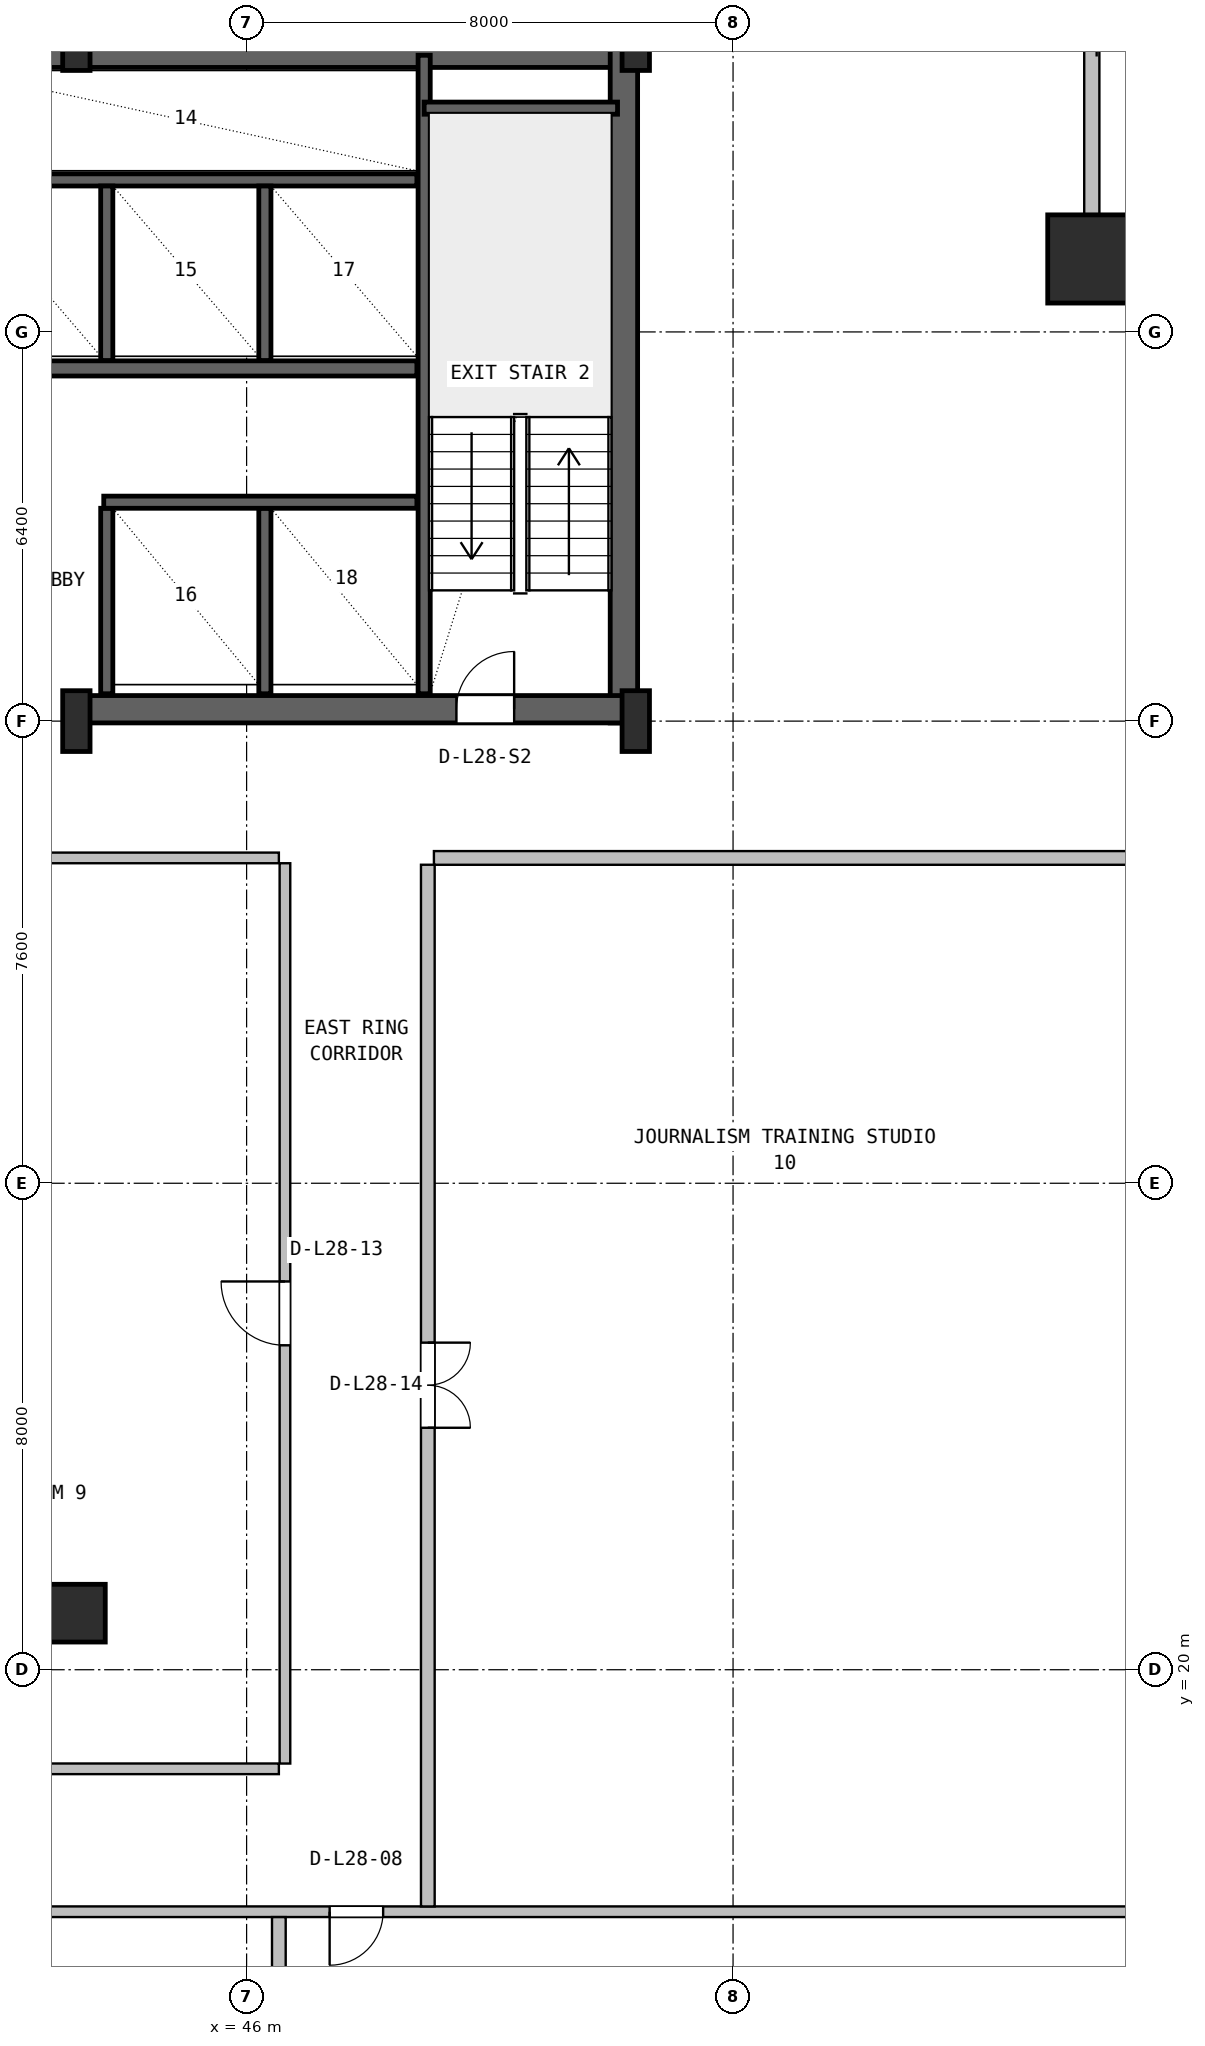
"""IFC4 building model, lengths in metres.
Left out: names, types, materials, properties, quantities, classifications, styles, units other than length and angle.
Written with IfcOpenShell. Run it as: python <this file> out.ifc"""

import sys

from ifc_helpers import new_model, si_unit, direction, frame, frame_2d, origin, origin_2d, place, context, subcontext, project, spatial, rectangle, hollow_rectangle, i_section, extrude, source, transform, mapped, element, fill, save


model = new_model("IFC4")
c1 = context("Model", 3, precision=1e-05, world=origin(), true_north=direction((0.0, 1.0)))
c2 = subcontext(c1, "Body", "Model", "MODEL_VIEW")
j1 = project(units=[si_unit("LENGTHUNIT", "METRE"), si_unit("PLANEANGLEUNIT", "RADIAN")], contexts=[c1])
p1 = place(None, origin())
s1 = spatial("IfcSite", under=j1, at=p1, CompositionType="ELEMENT")
p2 = place(p1, origin())
s2 = spatial("IfcBuilding", under=s1, at=p2, CompositionType="ELEMENT")
p3 = place(p2, frame((0.0, 0.0, 118.2)))
s3 = spatial("IfcBuildingStorey", under=s2, at=p3, CompositionType="ELEMENT", Elevation=118.2)
p4 = place(p3, frame((15.6, 46.575, 0.0), z_axis=(0.0, 0.0, 1.0), x_axis=(1.0, 0.0, 0.0)))
e1 = element("IfcWall", 1, at=p4, inside=s3, PredefinedType="SHEAR", context=c2, shape_type="SweptSolid", body=[
    extrude(rectangle(XDim=36.8, YDim=0.45, at=frame_2d((18.4, 0.0))), origin(), (0.0, 0.0, 1.0), 3.55),
])
p5 = place(p3, frame((52.205, 35.57, 0.0), z_axis=(0.0, 0.0, 1.0), x_axis=(0.0, 1.0, 0.0)))
e2 = element("IfcWall", 2, at=p5, inside=s3, PredefinedType="SHEAR", context=c2, shape_type="SweptSolid", body=[
    extrude(rectangle(XDim=11.23, YDim=0.45, at=frame_2d((5.615, 0.0))), origin(), (0.0, 0.0, 1.0), 3.55),
])
p6 = place(p3, frame((43.2, 35.795, 0.0), z_axis=(0.0, 0.0, 1.0), x_axis=(1.0, 0.0, 0.0)))
e3 = element("IfcWall", 3, at=p6, inside=s3, PredefinedType="SHEAR", context=c2, shape_type="SweptSolid", body=[
    extrude(rectangle(XDim=9.23, YDim=0.45, at=frame_2d((4.615, 0.0))), origin(), (0.0, 0.0, 1.0), 3.55),
])
p7 = place(p6, frame((6.25, 0.0, 0.0)))
e4 = element("IfcOpeningElement", 4, at=p7, cuts=e3, PredefinedType="OPENING", context=c2, shape_type="SweptSolid", body=[
    extrude(rectangle(XDim=0.95, YDim=2.1, at=frame_2d((0.475, 1.05))), frame((0.0, 0.235, 0.0), z_axis=(0.0, -1.0, 0.0), x_axis=(1.0, 0.0, 0.0)), (0.0, 0.0, 1.0), 0.47),
])
m1 = source(origin(), c2, "Body", "SweptSolid", [
    extrude(i_section(OverallWidth=0.45, OverallDepth=1.0, WebThickness=0.016, FlangeThickness=0.03, FilletRadius=0.016, at=origin_2d()), origin(), (0.0, 0.0, 1.0), 3.8),
])
for number, where, z_axis, x_axis in (
    (5, (43.2, 35.6, 0.0), (0.0, 0.0, 1.0), (1.0, 0.0, 0.0)),
    (6, (43.2, 46.8, 0.0), (0.0, 0.0, 1.0), (1.0, 0.0, 0.0)),
    (7, (52.4, 35.6, 0.0), (0.0, 0.0, 1.0), (1.0, 0.0, 0.0)),
    (8, (52.4, 46.8, 0.0), (0.0, 0.0, 1.0), (1.0, 0.0, 0.0)),
):
    element("IfcColumn", number, at=place(p3, frame(where, z_axis=z_axis, x_axis=x_axis)), inside=s3, PredefinedType="COLUMN", context=c2, shape_type="MappedRepresentation", body=[
        mapped(m1, transform((0.0, 0.0, 0.0), x_axis=(1.0, 0.0, 0.0), y_axis=(0.0, 1.0, 0.0), z_axis=(0.0, 0.0, 1.0), scale=1.0)),
    ])
m2 = source(origin(), c2, "Body", "SweptSolid", [
    extrude(hollow_rectangle(XDim=1.45, YDim=1.45, WallThickness=0.055, at=origin_2d()), origin(), (0.0, 0.0, 1.0), 3.8),
])
p8 = place(p3, frame((59.9, 43.2, 0.0), z_axis=(0.0, 0.0, 1.0), x_axis=(1.0, 0.0, 0.0)))
e9 = element("IfcColumn", 9, at=p8, inside=s3, PredefinedType="COLUMN", context=c2, shape_type="MappedRepresentation", body=[
    mapped(m2, transform((0.0, 0.0, 0.0), x_axis=(1.0, 0.0, 0.0), y_axis=(0.0, 1.0, 0.0), z_axis=(0.0, 0.0, 1.0), scale=1.0)),
])
m3 = source(origin(), c2, "Body", "SweptSolid", [
    extrude(rectangle(XDim=0.95, YDim=0.95, at=origin_2d()), origin(), (0.0, 0.0, 1.0), 3.8),
])
p9 = place(p3, frame((43.2, 20.93, 0.0), z_axis=(0.0, 0.0, 1.0), x_axis=(1.0, 0.0, 0.0)))
e10 = element("IfcColumn", 10, at=p9, inside=s3, PredefinedType="COLUMN", context=c2, shape_type="MappedRepresentation", body=[
    mapped(m3, transform((0.0, 0.0, 0.0), x_axis=(1.0, 0.0, 0.0), y_axis=(0.0, 1.0, 0.0), z_axis=(0.0, 0.0, 1.0), scale=1.0)),
])
p10 = place(p3, frame((60.03, 43.2, 0.0), z_axis=(0.0, 0.0, 1.0), x_axis=(1.0, 0.0, 0.0)))
e11 = element("IfcWall", 11, at=p10, inside=s3, PredefinedType="SOLIDWALL", context=c2, shape_type="SweptSolid", body=[
    extrude(rectangle(XDim=3.39, YDim=0.25, at=frame_2d((1.695, 0.0))), origin(), (0.0, 0.0, 1.0), 3.53),
])
p11 = place(p3, frame((59.9, 43.12, 0.0), z_axis=(0.0, 0.0, 1.0), x_axis=(0.0, 1.0, 0.0)))
e12 = element("IfcWall", 12, at=p11, inside=s3, PredefinedType="SOLIDWALL", context=c2, shape_type="SweptSolid", body=[
    extrude(rectangle(XDim=3.6, YDim=0.25, at=frame_2d((1.8, 0.0))), origin(), (0.0, 0.0, 1.0), 3.108),
])
p12 = place(p3, frame((48.92, 36.05, 0.0), z_axis=(0.0, 0.0, 1.0), x_axis=(0.0, 1.0, 0.0)))
e13 = element("IfcWall", 13, at=p12, inside=s3, PredefinedType="SHEAR", context=c2, shape_type="SweptSolid", body=[
    extrude(rectangle(XDim=10.5, YDim=0.2, at=frame_2d((5.25, 0.0))), origin(), (0.0, 0.0, 1.0), 3.55),
])
p13 = place(p3, frame((48.92, 45.68, 0.0), z_axis=(0.0, 0.0, 1.0), x_axis=(1.0, 0.0, 0.0)))
e14 = element("IfcWall", 14, at=p13, inside=s3, PredefinedType="SHEAR", context=c2, shape_type="SweptSolid", body=[
    extrude(rectangle(XDim=3.18, YDim=0.2, at=frame_2d((1.59, 0.0))), origin(), (0.0, 0.0, 1.0), 3.55),
])
p14 = place(p3, frame((24.98, 41.4, 0.0), z_axis=(0.0, 0.0, 1.0), x_axis=(1.0, 0.0, 0.0)))
e15 = element("IfcWall", 15, at=p14, inside=s3, PredefinedType="SHEAR", context=c2, shape_type="SweptSolid", body=[
    extrude(rectangle(XDim=23.82, YDim=0.25, at=frame_2d((11.91, 0.0))), origin(), (0.0, 0.0, 1.0), 3.55),
])
p15 = place(p14, frame((8.87, 0.0, 0.0)))
e16 = element("IfcOpeningElement", 16, at=p15, cuts=e15, PredefinedType="OPENING", context=c2, shape_type="SweptSolid", body=[
    extrude(rectangle(XDim=1.1, YDim=2.18, at=frame_2d((0.55, 1.09))), frame((0.0, 0.135, 0.0), z_axis=(0.0, -1.0, 0.0), x_axis=(1.0, 0.0, 0.0)), (0.0, 0.0, 1.0), 0.27),
])
p16 = place(p14, frame((11.47, 0.0, 0.0)))
e17 = element("IfcOpeningElement", 17, at=p16, cuts=e15, PredefinedType="OPENING", context=c2, shape_type="SweptSolid", body=[
    extrude(rectangle(XDim=1.1, YDim=2.18, at=frame_2d((0.55, 1.09))), frame((0.0, 0.135, 0.0), z_axis=(0.0, -1.0, 0.0), x_axis=(1.0, 0.0, 0.0)), (0.0, 0.0, 1.0), 0.27),
])
p17 = place(p14, frame((14.07, 0.0, 0.0)))
e18 = element("IfcOpeningElement", 18, at=p17, cuts=e15, PredefinedType="OPENING", context=c2, shape_type="SweptSolid", body=[
    extrude(rectangle(XDim=1.1, YDim=2.18, at=frame_2d((0.55, 1.09))), frame((0.0, 0.135, 0.0), z_axis=(0.0, -1.0, 0.0), x_axis=(1.0, 0.0, 0.0)), (0.0, 0.0, 1.0), 0.27),
])
p18 = place(p14, frame((1.81, 0.0, 0.0)))
e19 = element("IfcOpeningElement", 19, at=p18, cuts=e15, PredefinedType="OPENING", context=c2, shape_type="SweptSolid", body=[
    extrude(rectangle(XDim=0.92, YDim=2.08, at=frame_2d((0.46, 1.04))), frame((0.0, 0.135, 0.0), z_axis=(0.0, -1.0, 0.0), x_axis=(1.0, 0.0, 0.0)), (0.0, 0.0, 1.0), 0.27),
])
p19 = place(p14, frame((5.71, 0.0, 0.0)))
e20 = element("IfcOpeningElement", 20, at=p19, cuts=e15, PredefinedType="OPENING", context=c2, shape_type="SweptSolid", body=[
    extrude(rectangle(XDim=0.92, YDim=2.08, at=frame_2d((0.46, 1.04))), frame((0.0, 0.135, 0.0), z_axis=(0.0, -1.0, 0.0), x_axis=(1.0, 0.0, 0.0)), (0.0, 0.0, 1.0), 0.27),
])
p20 = place(p3, frame((41.22, 44.5, 0.0), z_axis=(0.0, 0.0, 1.0), x_axis=(1.0, 0.0, 0.0)))
e21 = element("IfcWall", 21, at=p20, inside=s3, PredefinedType="SHEAR", context=c2, shape_type="SweptSolid", body=[
    extrude(rectangle(XDim=7.58, YDim=0.2, at=frame_2d((3.79, 0.0))), origin(), (0.0, 0.0, 1.0), 3.55),
])
for number, where, z_axis, x_axis in (
    (22, (43.7, 41.53, 0.0), (0.0, 0.0, 1.0), (0.0, 1.0, 0.0)),
    (23, (46.3, 41.53, 0.0), (0.0, 0.0, 1.0), (0.0, 1.0, 0.0)),
):
    element("IfcWall", number, at=place(p3, frame(where, z_axis=z_axis, x_axis=x_axis)), inside=s3, PredefinedType="SHEAR", context=c2, shape_type="SweptSolid", body=[
        extrude(rectangle(XDim=2.87, YDim=0.2, at=frame_2d((1.435, 0.0))), origin(), (0.0, 0.0, 1.0), 3.55),
    ])
for number, where, z_axis, x_axis in (
    (24, (43.7, 36.05, 0.0), (0.0, 0.0, 1.0), (0.0, 1.0, 0.0)),
    (25, (46.3, 36.05, 0.0), (0.0, 0.0, 1.0), (0.0, 1.0, 0.0)),
):
    element("IfcWall", number, at=place(p3, frame(where, z_axis=z_axis, x_axis=x_axis)), inside=s3, PredefinedType="SHEAR", context=c2, shape_type="SweptSolid", body=[
        extrude(rectangle(XDim=3.05, YDim=0.2, at=frame_2d((1.525, 0.0))), origin(), (0.0, 0.0, 1.0), 3.55),
    ])
p21 = place(p3, frame((43.65, 39.2, 0.0), z_axis=(0.0, 0.0, 1.0), x_axis=(1.0, 0.0, 0.0)))
e26 = element("IfcWall", 26, at=p21, inside=s3, PredefinedType="SHEAR", context=c2, shape_type="SweptSolid", body=[
    extrude(rectangle(XDim=5.15, YDim=0.2, at=frame_2d((2.575, 0.0))), origin(), (0.0, 0.0, 1.0), 3.55),
])
p22 = place(p3, frame((4.68, 16.02, 0.0), z_axis=(0.0, 0.0, 1.0), x_axis=(1.0, 0.0, 0.0)))
e27 = element("IfcWall", 27, at=p22, inside=s3, PredefinedType="PARTITIONING", context=c2, shape_type="SweptSolid", body=[
    extrude(rectangle(XDim=58.64, YDim=0.175, at=frame_2d((29.32, 0.0))), origin(), (0.0, 0.0, 1.0), 2.83),
])
p23 = place(p22, frame((16.13, 0.0, 0.0)))
e28 = element("IfcOpeningElement", 28, at=p23, cuts=e27, PredefinedType="OPENING", context=c2, shape_type="SweptSolid", body=[
    extrude(rectangle(XDim=1.05, YDim=2.1, at=frame_2d((0.525, 1.05))), frame((0.0, 0.098, 0.0), z_axis=(0.0, -1.0, 0.0), x_axis=(1.0, 0.0, 0.0)), (0.0, 0.0, 1.0), 0.195),
])
p24 = place(p22, frame((24.41, 0.0, 0.0)))
e29 = element("IfcOpeningElement", 29, at=p24, cuts=e27, PredefinedType="OPENING", context=c2, shape_type="SweptSolid", body=[
    extrude(rectangle(XDim=1.05, YDim=2.1, at=frame_2d((0.525, 1.05))), frame((0.0, 0.098, 0.0), z_axis=(0.0, -1.0, 0.0), x_axis=(1.0, 0.0, 0.0)), (0.0, 0.0, 1.0), 0.195),
])
p25 = place(p22, frame((36.295, 0.0, 0.0)))
e30 = element("IfcOpeningElement", 30, at=p25, cuts=e27, PredefinedType="OPENING", context=c2, shape_type="SweptSolid", body=[
    extrude(rectangle(XDim=1.4, YDim=2.12, at=frame_2d((0.7, 1.06))), frame((0.0, 0.098, 0.0), z_axis=(0.0, -1.0, 0.0), x_axis=(1.0, 0.0, 0.0)), (0.0, 0.0, 1.0), 0.195),
])
p26 = place(p22, frame((42.685, 0.0, 0.0)))
e31 = element("IfcOpeningElement", 31, at=p26, cuts=e27, PredefinedType="OPENING", context=c2, shape_type="SweptSolid", body=[
    extrude(rectangle(XDim=0.88, YDim=2.06, at=frame_2d((0.44, 1.03))), frame((0.0, 0.098, 0.0), z_axis=(0.0, -1.0, 0.0), x_axis=(1.0, 0.0, 0.0)), (0.0, 0.0, 1.0), 0.195),
])
p27 = place(p3, frame((46.53, 4.38, 0.0), z_axis=(0.0, 0.0, 1.0), x_axis=(0.0, 1.0, 0.0)))
e32 = element("IfcWall", 32, at=p27, inside=s3, PredefinedType="PARTITIONING", context=c2, shape_type="SweptSolid", body=[
    extrude(rectangle(XDim=11.552, YDim=0.225, at=frame_2d((5.776, 0.0))), origin(), (0.0, 0.0, 1.0), 3.108),
])
for number, where, z_axis, x_axis in (
    (33, (22.61, 18.37, 0.0), (0.0, 0.0, 1.0), (1.0, 0.0, 0.0)),
    (34, (22.61, 33.35, 0.0), (0.0, 0.0, 1.0), (1.0, 0.0, 0.0)),
):
    element("IfcWall", number, at=place(p3, frame(where, z_axis=z_axis, x_axis=x_axis)), inside=s3, PredefinedType="PARTITIONING", context=c2, shape_type="SweptSolid", body=[
        extrude(rectangle(XDim=23.92, YDim=0.175, at=frame_2d((11.96, 0.0))), origin(), (0.0, 0.0, 1.0), 2.83),
    ])
p28 = place(p3, frame((46.63, 18.457, 0.0), z_axis=(0.0, 0.0, 1.0), x_axis=(0.0, 1.0, 0.0)))
e35 = element("IfcWall", 35, at=p28, inside=s3, PredefinedType="PARTITIONING", context=c2, shape_type="SweptSolid", body=[
    extrude(rectangle(XDim=14.806, YDim=0.175, at=frame_2d((7.403, 0.0))), origin(), (0.0, 0.0, 1.0), 3.222),
])
p29 = place(p28, frame((6.878, 0.0, 0.0)))
e36 = element("IfcOpeningElement", 36, at=p29, cuts=e35, PredefinedType="OPENING", context=c2, shape_type="SweptSolid", body=[
    extrude(rectangle(XDim=1.05, YDim=2.1, at=frame_2d((0.525, 1.05))), frame((0.0, 0.098, 0.0), z_axis=(0.0, -1.0, 0.0), x_axis=(1.0, 0.0, 0.0)), (0.0, 0.0, 1.0), 0.195),
])
p30 = place(p3, frame((49.08, 33.35, 0.0), z_axis=(0.0, 0.0, 1.0), x_axis=(1.0, 0.0, 0.0)))
e37 = element("IfcWall", 37, at=p30, inside=s3, PredefinedType="PARTITIONING", context=c2, shape_type="SweptSolid", body=[
    extrude(rectangle(XDim=14.24, YDim=0.225, at=frame_2d((7.12, 0.0))), origin(), (0.0, 0.0, 1.0), 3.108),
])
p31 = place(p3, frame((48.98, 16.107, 0.0), z_axis=(0.0, 0.0, 1.0), x_axis=(0.0, 1.0, 0.0)))
e38 = element("IfcWall", 38, at=p31, inside=s3, PredefinedType="PARTITIONING", context=c2, shape_type="SweptSolid", body=[
    extrude(rectangle(XDim=17.131, YDim=0.225, at=frame_2d((8.565, 0.0))), origin(), (0.0, 0.0, 1.0), 3.222),
])
p32 = place(p31, frame((7.872, 0.0, 0.0)))
e39 = element("IfcOpeningElement", 39, at=p32, cuts=e38, PredefinedType="OPENING", context=c2, shape_type="SweptSolid", body=[
    extrude(rectangle(XDim=1.4, YDim=2.12, at=frame_2d((0.7, 1.06))), frame((0.0, 0.123, 0.0), z_axis=(0.0, -1.0, 0.0), x_axis=(1.0, 0.0, 0.0)), (0.0, 0.0, 1.0), 0.245),
])
m4 = source(origin(), c2, "Body", "SweptSolid", [
    extrude(rectangle(XDim=0.95, YDim=2.1, at=frame_2d((0.475, 1.05))), frame((0.0, 0.025, 0.0), z_axis=(0.0, -1.0, 0.0), x_axis=(1.0, 0.0, 0.0)), (0.0, 0.0, 1.0), 0.05),
])
p33 = place(p7, origin())
e40 = element("IfcDoor", 40, at=p33, inside=s3, OperationType="SINGLE_SWING_RIGHT", PredefinedType="DOOR", context=c2, shape_type="MappedRepresentation", body=[
    mapped(m4, transform((0.0, 0.0, 0.0), x_axis=(1.0, 0.0, 0.0), y_axis=(0.0, 1.0, 0.0), z_axis=(0.0, 0.0, 1.0), scale=1.0)),
])
fill(e4, e40)
m5 = source(origin(), c2, "Body", "SweptSolid", [
    extrude(rectangle(XDim=0.88, YDim=2.06, at=frame_2d((0.44, 1.03))), frame((0.0, 0.025, 0.0), z_axis=(0.0, -1.0, 0.0), x_axis=(1.0, 0.0, 0.0)), (0.0, 0.0, 1.0), 0.05),
])
p34 = place(p26, frame((0.88, 0.0, 0.0), z_axis=(0.0, 0.0, 1.0), x_axis=(-1.0, 0.0, 0.0)))
e41 = element("IfcDoor", 41, at=p34, inside=s3, OperationType="SINGLE_SWING_LEFT", PredefinedType="DOOR", context=c2, shape_type="MappedRepresentation", body=[
    mapped(m5, transform((0.0, 0.0, 0.0), x_axis=(1.0, 0.0, 0.0), y_axis=(0.0, 1.0, 0.0), z_axis=(0.0, 0.0, 1.0), scale=1.0)),
])
fill(e31, e41)
m6 = source(origin(), c2, "Body", "SweptSolid", [
    extrude(rectangle(XDim=1.05, YDim=2.1, at=frame_2d((0.525, 1.05))), frame((0.0, 0.025, 0.0), z_axis=(0.0, -1.0, 0.0), x_axis=(1.0, 0.0, 0.0)), (0.0, 0.0, 1.0), 0.05),
])
p35 = place(p29, origin())
e42 = element("IfcDoor", 42, at=p35, inside=s3, OperationType="SINGLE_SWING_RIGHT", PredefinedType="DOOR", context=c2, shape_type="MappedRepresentation", body=[
    mapped(m6, transform((0.0, 0.0, 0.0), x_axis=(1.0, 0.0, 0.0), y_axis=(0.0, 1.0, 0.0), z_axis=(0.0, 0.0, 1.0), scale=1.0)),
])
fill(e36, e42)
m7 = source(origin(), c2, "Body", "SweptSolid", [
    extrude(rectangle(XDim=1.4, YDim=2.12, at=frame_2d((0.7, 1.06))), frame((0.0, 0.025, 0.0), z_axis=(0.0, -1.0, 0.0), x_axis=(1.0, 0.0, 0.0)), (0.0, 0.0, 1.0), 0.05),
])
p36 = place(p32, frame((1.4, 0.0, 0.0), z_axis=(0.0, 0.0, 1.0), x_axis=(-1.0, 0.0, 0.0)))
e43 = element("IfcDoor", 43, at=p36, inside=s3, OperationType="DOUBLE_DOOR_SINGLE_SWING", PredefinedType="DOOR", context=c2, shape_type="MappedRepresentation", body=[
    mapped(m7, transform((0.0, 0.0, 0.0), x_axis=(1.0, 0.0, 0.0), y_axis=(0.0, 1.0, 0.0), z_axis=(0.0, 0.0, 1.0), scale=1.0)),
])
fill(e39, e43)
save(model, sys.argv[1])
